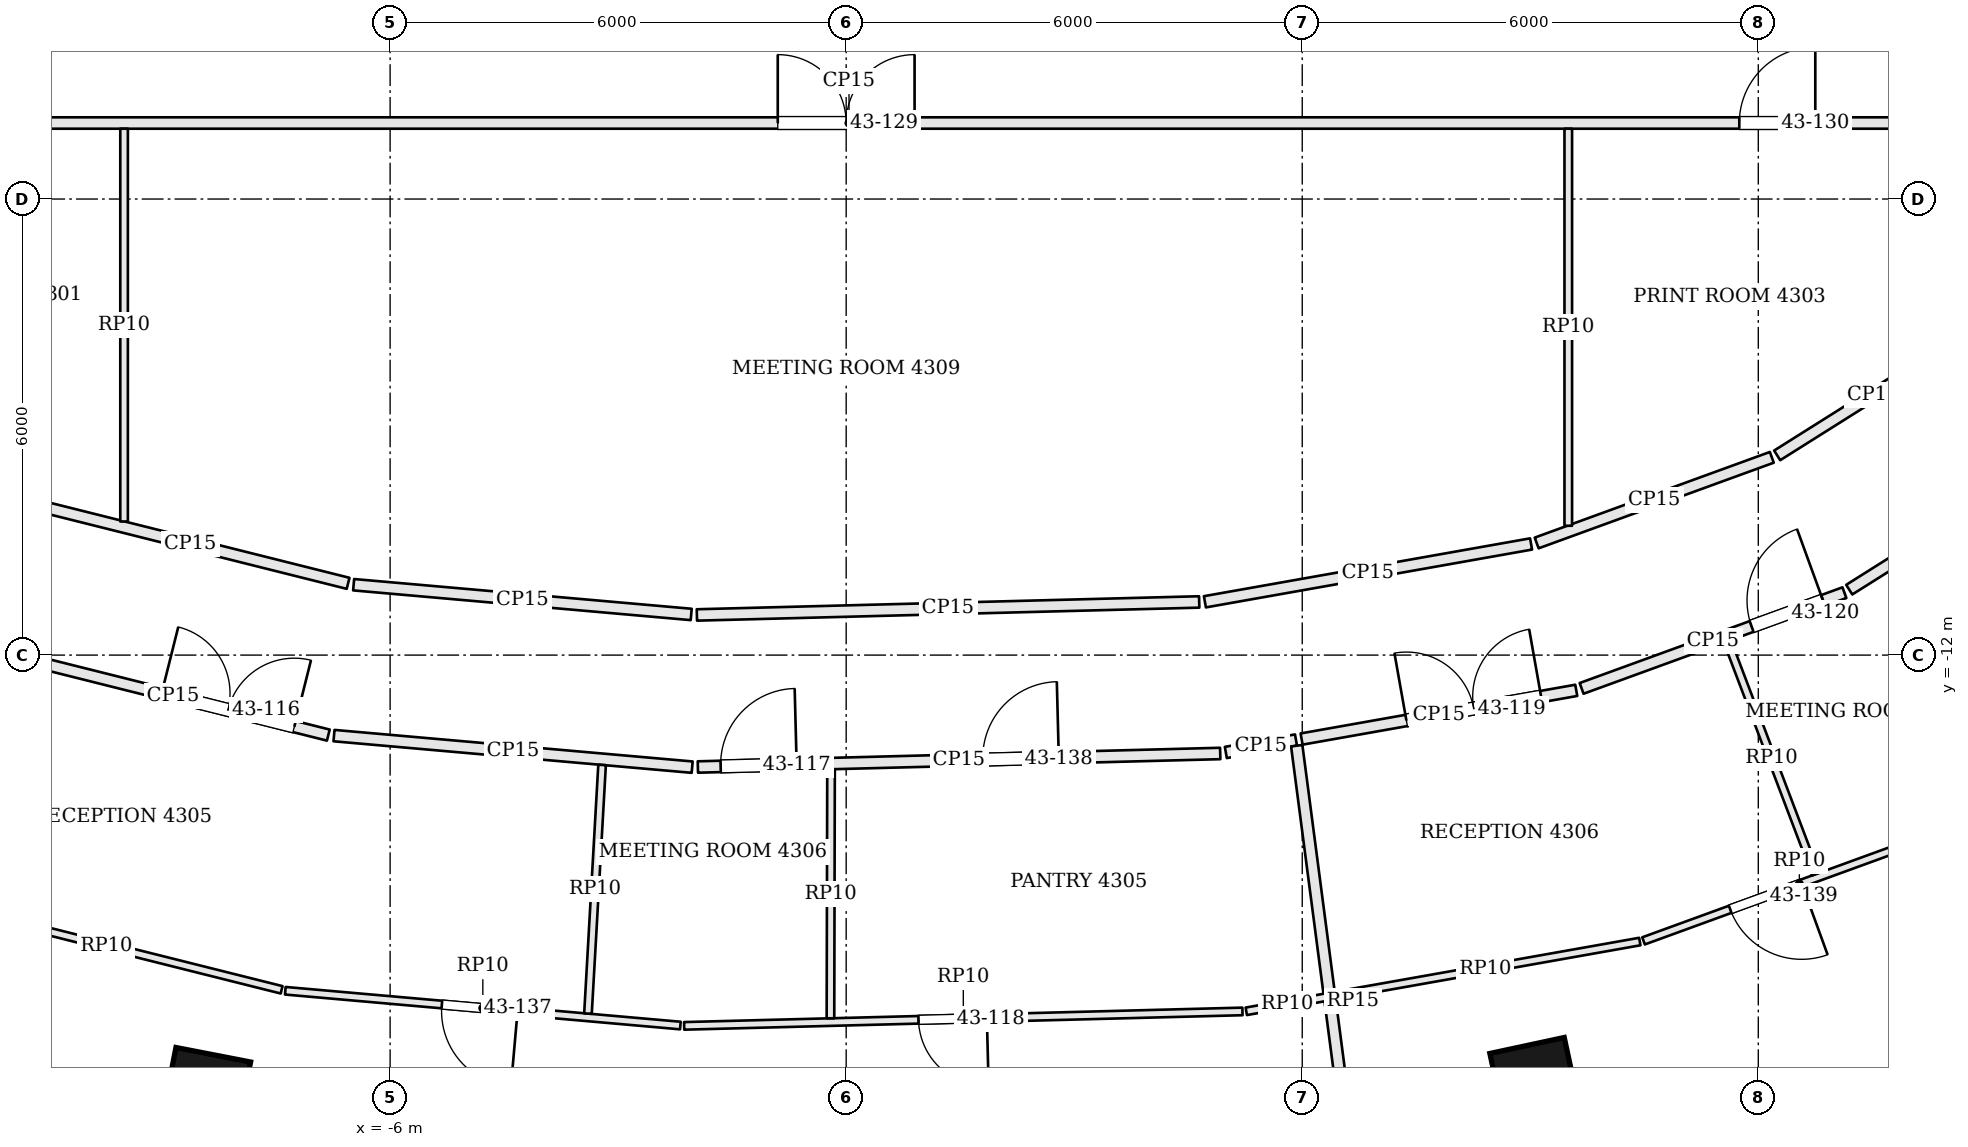
"""IFC4 building model, lengths in metres.
Left out: names, types, materials, properties, quantities, classifications, styles, units other than length and angle.
Written with IfcOpenShell. Run it as: python <this file> out.ifc"""

import sys

from ifc_helpers import new_model, si_unit, direction, frame, frame_2d, origin, origin_2d, place, context, subcontext, project, spatial, rectangle, extrude, element, fill, save


model = new_model("IFC4")
c1 = context("Model", 3, precision=1e-05, world=origin(), true_north=direction((0.0, 1.0)))
c2 = subcontext(c1, "Body", "Model", "MODEL_VIEW")
j1 = project(units=[si_unit("LENGTHUNIT", "METRE"), si_unit("PLANEANGLEUNIT", "RADIAN")], contexts=[c1])
p1 = place(None, origin())
s1 = spatial("IfcSite", under=j1, at=p1, CompositionType="ELEMENT")
p2 = place(p1, origin())
s2 = spatial("IfcBuilding", under=s1, at=p2, CompositionType="ELEMENT")
p3 = place(p2, frame((0.0, 0.0, 177.9)))
s3 = spatial("IfcBuildingStorey", under=s2, at=p3, CompositionType="ELEMENT", Elevation=177.9)
for number, where, z_axis, x_axis in (
    (1, (-8.422, -17.749, 0.0), (0.0, 0.0, 1.0), (0.982, -0.191, 0.0)),
    (2, (9.063, -17.625, 0.0), (0.0, 0.0, 1.0), (0.978, 0.21, 0.0)),
):
    element("IfcColumn", number, at=place(p3, frame(where, z_axis=z_axis, x_axis=x_axis)), inside=s3, PredefinedType="COLUMN", context=c2, shape_type="SweptSolid", body=[
        extrude(rectangle(XDim=1.0, YDim=1.0, at=origin_2d()), origin(), (0.0, 0.0, 1.0), 3.9),
    ])
p4 = place(p3, frame((-10.897, -12.029, 0.0), z_axis=(0.0, 0.0, 1.0), x_axis=(0.969999087169, -0.24310855783, 0.0)))
e3 = element("IfcWall", 3, at=p4, inside=s3, PredefinedType="PARTITIONING", context=c2, shape_type="SweptSolid", body=[
    extrude(rectangle(XDim=4.211, YDim=0.15, at=frame_2d((2.105, 0.0))), origin(), (0.0, 0.0, 1.0), 3.084),
])
p5 = place(p4, frame((1.95, 0.0, 0.0)))
e4 = element("IfcOpeningElement", 4, at=p5, cuts=e3, PredefinedType="OPENING", context=c2, shape_type="SweptSolid", body=[
    extrude(rectangle(XDim=1.8, YDim=2.1, at=frame_2d((0.9, 1.05))), frame((0.0, 0.085, 0.0), z_axis=(0.0, -1.0, 0.0), x_axis=(1.0, 0.0, 0.0)), (0.0, 0.0, 1.0), 0.17),
])
p6 = place(p3, frame((-6.738, -13.059, 0.0), z_axis=(0.0, 0.0, 1.0), x_axis=(0.996143527037, -0.087738666181, 0.0)))
e5 = element("IfcWall", 5, at=p6, inside=s3, PredefinedType="PARTITIONING", context=c2, shape_type="SweptSolid", body=[
    extrude(rectangle(XDim=4.73, YDim=0.15, at=frame_2d((2.365, 0.0))), origin(), (0.0, 0.0, 1.0), 3.084),
])
p7 = place(p3, frame((-1.951, -13.472, 0.0), z_axis=(0.0, 0.0, 1.0), x_axis=(0.999663898238, 0.025924709429, 0.0)))
e6 = element("IfcWall", 6, at=p7, inside=s3, PredefinedType="PARTITIONING", context=c2, shape_type="SweptSolid", body=[
    extrude(rectangle(XDim=6.875, YDim=0.15, at=frame_2d((3.437, 0.0))), origin(), (0.0, 0.0, 1.0), 3.084),
])
p8 = place(p7, frame((0.3, 0.0, 0.0)))
e7 = element("IfcOpeningElement", 7, at=p8, cuts=e6, PredefinedType="OPENING", context=c2, shape_type="SweptSolid", body=[
    extrude(rectangle(XDim=1.0, YDim=2.4, at=frame_2d((0.5, 1.2))), frame((0.0, 0.085, 0.0), z_axis=(0.0, -1.0, 0.0), x_axis=(1.0, 0.0, 0.0)), (0.0, 0.0, 1.0), 0.17),
])
p9 = place(p7, frame((3.75, 0.0, 0.0)))
e8 = element("IfcOpeningElement", 8, at=p9, cuts=e6, PredefinedType="OPENING", context=c2, shape_type="SweptSolid", body=[
    extrude(rectangle(XDim=1.0, YDim=2.1, at=frame_2d((0.5, 1.05))), frame((0.0, 0.085, 0.0), z_axis=(0.0, -1.0, 0.0), x_axis=(1.0, 0.0, 0.0)), (0.0, 0.0, 1.0), 0.17),
])
p10 = place(p3, frame((4.995, -13.281, 0.0), z_axis=(0.0, 0.0, 1.0), x_axis=(0.984615318048, 0.174736016506, 0.0)))
e9 = element("IfcWall", 9, at=p10, inside=s3, PredefinedType="PARTITIONING", context=c2, shape_type="SweptSolid", body=[
    extrude(rectangle(XDim=0.938, YDim=0.15, at=frame_2d((0.469, 0.0))), origin(), (0.0, 0.0, 1.0), 3.084),
])
p11 = place(p3, frame((6.807, -19.901, 0.0), z_axis=(0.0, 0.0, 1.0), x_axis=(-0.129934596003, 0.991522566945, 0.0)))
e10 = element("IfcWall", 10, at=p11, inside=s3, PredefinedType="PARTITIONING", context=c2, shape_type="SweptSolid", body=[
    extrude(rectangle(XDim=6.766, YDim=0.15, at=frame_2d((3.383, 0.0))), origin(), (0.0, 0.0, 1.0), 3.234),
])
p12 = place(p3, frame((5.992, -13.104, 0.0), z_axis=(0.0, 0.0, 1.0), x_axis=(0.98463249319, 0.174639209096, 0.0)))
e11 = element("IfcWall", 11, at=p12, inside=s3, PredefinedType="PARTITIONING", context=c2, shape_type="SweptSolid", body=[
    extrude(rectangle(XDim=3.67, YDim=0.15, at=frame_2d((1.835, 0.0))), origin(), (0.0, 0.0, 1.0), 3.084),
])
p13 = place(p12, frame((1.4, 0.0, 0.0)))
e12 = element("IfcOpeningElement", 12, at=p13, cuts=e11, PredefinedType="OPENING", context=c2, shape_type="SweptSolid", body=[
    extrude(rectangle(XDim=1.8, YDim=2.1, at=frame_2d((0.9, 1.05))), frame((0.0, 0.085, 0.0), z_axis=(0.0, -1.0, 0.0), x_axis=(1.0, 0.0, 0.0)), (0.0, 0.0, 1.0), 0.17),
])
p14 = place(p3, frame((9.676, -12.438, 0.0), z_axis=(0.0, 0.0, 1.0), x_axis=(0.939640289748, 0.342163887461, 0.0)))
e13 = element("IfcWall", 13, at=p14, inside=s3, PredefinedType="PARTITIONING", context=c2, shape_type="SweptSolid", body=[
    extrude(rectangle(XDim=3.68, YDim=0.15, at=frame_2d((1.84, 0.0))), origin(), (0.0, 0.0, 1.0), 3.084),
])
p15 = place(p14, frame((2.38, 0.0, 0.0)))
e14 = element("IfcOpeningElement", 14, at=p15, cuts=e13, PredefinedType="OPENING", context=c2, shape_type="SweptSolid", body=[
    extrude(rectangle(XDim=1.0, YDim=2.4, at=frame_2d((0.5, 1.2))), frame((0.0, 0.085, 0.0), z_axis=(0.0, -1.0, 0.0), x_axis=(1.0, 0.0, 0.0)), (0.0, 0.0, 1.0), 0.17),
])
p16 = place(p3, frame((13.197, -11.139, 0.0), z_axis=(0.0, 0.0, 1.0), x_axis=(0.846390903833, 0.532562144644, 0.0)))
e15 = element("IfcWall", 15, at=p16, inside=s3, PredefinedType="PARTITIONING", context=c2, shape_type="SweptSolid", body=[
    extrude(rectangle(XDim=3.481, YDim=0.15, at=frame_2d((1.741, 0.0))), origin(), (0.0, 0.0, 1.0), 3.084),
])
p17 = place(p16, frame((1.45, 0.0, 0.0)))
e16 = element("IfcOpeningElement", 16, at=p17, cuts=e15, PredefinedType="OPENING", context=c2, shape_type="SweptSolid", body=[
    extrude(rectangle(XDim=1.0, YDim=2.1, at=frame_2d((0.5, 1.05))), frame((0.0, 0.085, 0.0), z_axis=(0.0, -1.0, 0.0), x_axis=(1.0, 0.0, 0.0)), (0.0, 0.0, 1.0), 0.17),
])
p18 = place(p3, frame((14.777, -7.781, 0.0), z_axis=(0.0, 0.0, 1.0), x_axis=(-0.846359741043, -0.532611667862, 0.0)))
e17 = element("IfcWall", 17, at=p18, inside=s3, PredefinedType="PARTITIONING", context=c2, shape_type="SweptSolid", body=[
    extrude(rectangle(XDim=2.987, YDim=0.15, at=frame_2d((1.494, 0.0))), origin(), (0.0, 0.0, 1.0), 3.084),
])
p19 = place(p3, frame((12.178, -9.398, 0.0), z_axis=(0.0, 0.0, 1.0), x_axis=(-0.939609240084, -0.342249143093, 0.0)))
e18 = element("IfcWall", 18, at=p19, inside=s3, PredefinedType="PARTITIONING", context=c2, shape_type="SweptSolid", body=[
    extrude(rectangle(XDim=3.292, YDim=0.15, at=frame_2d((1.646, 0.0))), origin(), (0.0, 0.0, 1.0), 3.084),
])
p20 = place(p3, frame((9.01, -10.538, 0.0), z_axis=(0.0, 0.0, 1.0), x_axis=(-0.984645638575, -0.174565077936, 0.0)))
e19 = element("IfcWall", 19, at=p20, inside=s3, PredefinedType="PARTITIONING", context=c2, shape_type="SweptSolid", body=[
    extrude(rectangle(XDim=4.358, YDim=0.15, at=frame_2d((2.179, 0.0))), origin(), (0.0, 0.0, 1.0), 3.084),
])
p21 = place(p3, frame((4.645, -11.301, 0.0), z_axis=(0.0, 0.0, 1.0), x_axis=(-0.9996648469, -0.02588810291, 0.0)))
e20 = element("IfcWall", 20, at=p21, inside=s3, PredefinedType="PARTITIONING", context=c2, shape_type="SweptSolid", body=[
    extrude(rectangle(XDim=6.611, YDim=0.15, at=frame_2d((3.305, 0.0))), origin(), (0.0, 0.0, 1.0), 3.084),
])
p22 = place(p3, frame((-2.039, -11.465, 0.0), z_axis=(0.0, 0.0, 1.0), x_axis=(-0.996139855484, 0.087780341286, 0.0)))
e21 = element("IfcWall", 21, at=p22, inside=s3, PredefinedType="PARTITIONING", context=c2, shape_type="SweptSolid", body=[
    extrude(rectangle(XDim=4.458, YDim=0.15, at=frame_2d((2.229, 0.0))), origin(), (0.0, 0.0, 1.0), 3.084),
])
p23 = place(p3, frame((-6.553, -11.056, 0.0), z_axis=(0.0, 0.0, 1.0), x_axis=(-0.970004917182, 0.243085294995, 0.0)))
e22 = element("IfcWall", 22, at=p23, inside=s3, PredefinedType="PARTITIONING", context=c2, shape_type="SweptSolid", body=[
    extrude(rectangle(XDim=4.284, YDim=0.15, at=frame_2d((2.142, 0.0))), origin(), (0.0, 0.0, 1.0), 3.084),
])
p24 = place(p3, frame((-14.925, -5.0, 0.0), z_axis=(0.0, 0.0, 1.0), x_axis=(1.0, 0.0, 0.0)))
e23 = element("IfcWall", 23, at=p24, inside=s3, PredefinedType="PARTITIONING", context=c2, shape_type="SweptSolid", body=[
    extrude(rectangle(XDim=29.925, YDim=0.15, at=frame_2d((14.962, 0.0))), origin(), (0.0, 0.0, 1.0), 3.084),
])
p25 = place(p24, frame((2.175, 0.0, 0.0)))
e24 = element("IfcOpeningElement", 24, at=p25, cuts=e23, PredefinedType="OPENING", context=c2, shape_type="SweptSolid", body=[
    extrude(rectangle(XDim=1.0, YDim=2.1, at=frame_2d((0.5, 1.05))), frame((0.0, 0.085, 0.0), z_axis=(0.0, -1.0, 0.0), x_axis=(1.0, 0.0, 0.0)), (0.0, 0.0, 1.0), 0.17),
])
p26 = place(p24, frame((14.025, 0.0, 0.0)))
e25 = element("IfcOpeningElement", 25, at=p26, cuts=e23, PredefinedType="OPENING", context=c2, shape_type="SweptSolid", body=[
    extrude(rectangle(XDim=1.8, YDim=2.1, at=frame_2d((0.9, 1.05))), frame((0.0, 0.085, 0.0), z_axis=(0.0, -1.0, 0.0), x_axis=(1.0, 0.0, 0.0)), (0.0, 0.0, 1.0), 0.17),
])
p27 = place(p24, frame((26.675, 0.0, 0.0)))
e26 = element("IfcOpeningElement", 26, at=p27, cuts=e23, PredefinedType="OPENING", context=c2, shape_type="SweptSolid", body=[
    extrude(rectangle(XDim=1.0, YDim=2.1, at=frame_2d((0.5, 1.05))), frame((0.0, 0.085, 0.0), z_axis=(0.0, -1.0, 0.0), x_axis=(1.0, 0.0, 0.0)), (0.0, 0.0, 1.0), 0.17),
])
p28 = place(p3, frame((6.34, -16.496, 0.0), z_axis=(0.0, 0.0, 1.0), x_axis=(-0.984632558058, -0.174638843366, 0.0)))
e27 = element("IfcWall", 27, at=p28, inside=s3, PredefinedType="PARTITIONING", context=c2, shape_type="SweptSolid", body=[
    extrude(rectangle(XDim=1.093, YDim=0.1, at=frame_2d((0.547, 0.0))), origin(), (0.0, 0.0, 1.0), 3.084),
])
p29 = place(p3, frame((5.214, -16.688, 0.0), z_axis=(0.0, 0.0, 1.0), x_axis=(-0.999664981446, -0.025882906921, 0.0)))
e28 = element("IfcWall", 28, at=p29, inside=s3, PredefinedType="PARTITIONING", context=c2, shape_type="SweptSolid", body=[
    extrude(rectangle(XDim=7.348, YDim=0.1, at=frame_2d((3.674, 0.0))), origin(), (0.0, 0.0, 1.0), 3.084),
])
p30 = place(p29, frame((3.364, 0.0, 0.0)))
e29 = element("IfcOpeningElement", 29, at=p30, cuts=e28, PredefinedType="OPENING", context=c2, shape_type="SweptSolid", body=[
    extrude(rectangle(XDim=0.9, YDim=2.1, at=frame_2d((0.45, 1.05))), frame((0.0, 0.06, 0.0), z_axis=(0.0, -1.0, 0.0), x_axis=(1.0, 0.0, 0.0)), (0.0, 0.0, 1.0), 0.12),
])
p31 = place(p3, frame((-2.181, -16.874, 0.0), z_axis=(0.0, 0.0, 1.0), x_axis=(-0.996143934904, 0.087734035321, 0.0)))
e30 = element("IfcWall", 30, at=p31, inside=s3, PredefinedType="PARTITIONING", context=c2, shape_type="SweptSolid", body=[
    extrude(rectangle(XDim=5.218, YDim=0.1, at=frame_2d((2.609, 0.0))), origin(), (0.0, 0.0, 1.0), 3.084),
])
p32 = place(p31, frame((2.15, 0.0, 0.0)))
e31 = element("IfcOpeningElement", 31, at=p32, cuts=e30, PredefinedType="OPENING", context=c2, shape_type="SweptSolid", body=[
    extrude(rectangle(XDim=1.0, YDim=2.1, at=frame_2d((0.5, 1.05))), frame((0.0, 0.06, 0.0), z_axis=(0.0, -1.0, 0.0), x_axis=(1.0, 0.0, 0.0)), (0.0, 0.0, 1.0), 0.12),
])
p33 = place(p3, frame((-7.427, -16.404, 0.0), z_axis=(0.0, 0.0, 1.0), x_axis=(-0.970009433409, 0.243067272783, 0.0)))
e32 = element("IfcWall", 32, at=p33, inside=s3, PredefinedType="PARTITIONING", context=c2, shape_type="SweptSolid", body=[
    extrude(rectangle(XDim=4.754, YDim=0.1, at=frame_2d((2.377, 0.0))), origin(), (0.0, 0.0, 1.0), 3.084),
])
p34 = place(p3, frame((-3.211, -13.445, 0.0), z_axis=(0.0, 0.0, 1.0), x_axis=(-0.056703901856, -0.99839103938, 0.0)))
e33 = element("IfcWall", 33, at=p34, inside=s3, PredefinedType="PARTITIONING", context=c2, shape_type="SweptSolid", body=[
    extrude(rectangle(XDim=3.277, YDim=0.1, at=frame_2d((1.638, 0.0))), origin(), (0.0, 0.0, 1.0), 3.084),
])
p35 = place(p3, frame((-0.199, -13.502, 0.0), z_axis=(0.0, 0.0, 1.0), x_axis=(-0.002309978934, -0.999997331995, 0.0)))
e34 = element("IfcWall", 34, at=p35, inside=s3, PredefinedType="PARTITIONING", context=c2, shape_type="SweptSolid", body=[
    extrude(rectangle(XDim=3.276, YDim=0.1, at=frame_2d((1.638, 0.0))), origin(), (0.0, 0.0, 1.0), 3.084),
])
p36 = place(p3, frame((14.59, -14.267, 0.0), z_axis=(0.0, 0.0, 1.0), x_axis=(-0.939623405418, -0.342210251148, 0.0)))
e35 = element("IfcWall", 35, at=p36, inside=s3, PredefinedType="PARTITIONING", context=c2, shape_type="SweptSolid", body=[
    extrude(rectangle(XDim=4.363, YDim=0.1, at=frame_2d((2.182, 0.0))), origin(), (0.0, 0.0, 1.0), 3.084),
])
p37 = place(p36, frame((2.15, 0.0, 0.0)))
e36 = element("IfcOpeningElement", 36, at=p37, cuts=e35, PredefinedType="OPENING", context=c2, shape_type="SweptSolid", body=[
    extrude(rectangle(XDim=1.0, YDim=2.1, at=frame_2d((0.5, 1.05))), frame((0.0, 0.06, 0.0), z_axis=(0.0, -1.0, 0.0), x_axis=(1.0, 0.0, 0.0)), (0.0, 0.0, 1.0), 0.12),
])
p38 = place(p3, frame((10.441, -15.769, 0.0), z_axis=(0.0, 0.0, 1.0), x_axis=(-0.984637220861, -0.174612551941, 0.0)))
e37 = element("IfcWall", 37, at=p38, inside=s3, PredefinedType="PARTITIONING", context=c2, shape_type="SweptSolid", body=[
    extrude(rectangle(XDim=4.125, YDim=0.1, at=frame_2d((2.062, 0.0))), origin(), (0.0, 0.0, 1.0), 3.084),
])
p39 = place(p3, frame((11.594, -11.819, 0.0), z_axis=(0.0, 0.0, 1.0), x_axis=(0.354584575087, -0.935023945742, 0.0)))
e38 = element("IfcWall", 38, at=p39, inside=s3, PredefinedType="PARTITIONING", context=c2, shape_type="SweptSolid", body=[
    extrude(rectangle(XDim=3.275, YDim=0.1, at=frame_2d((1.638, 0.0))), origin(), (0.0, 0.0, 1.0), 3.084),
])
p40 = place(p3, frame((-9.5, -10.242, 0.0), z_axis=(0.0, 0.0, 1.0), x_axis=(0.0, 1.0, 0.0)))
e39 = element("IfcWall", 39, at=p40, inside=s3, PredefinedType="PARTITIONING", context=c2, shape_type="SweptSolid", body=[
    extrude(rectangle(XDim=5.167, YDim=0.1, at=frame_2d((2.583, 0.0))), origin(), (0.0, 0.0, 1.0), 3.084),
])
p41 = place(p3, frame((9.5, -10.299, 0.0), z_axis=(0.0, 0.0, 1.0), x_axis=(0.0, 1.0, 0.0)))
e40 = element("IfcWall", 40, at=p41, inside=s3, PredefinedType="PARTITIONING", context=c2, shape_type="SweptSolid", body=[
    extrude(rectangle(XDim=5.224, YDim=0.1, at=frame_2d((2.612, 0.0))), origin(), (0.0, 0.0, 1.0), 3.084),
])
p42 = place(p5, origin())
e41 = element("IfcDoor", 41, at=p42, inside=s3, OperationType="DOUBLE_DOOR_SINGLE_SWING", PredefinedType="DOOR", context=c2, shape_type="SweptSolid", body=[
    extrude(rectangle(XDim=1.8, YDim=2.1, at=frame_2d((0.9, 1.05))), frame((0.0, 0.025, 0.0), z_axis=(0.0, -1.0, 0.0), x_axis=(1.0, 0.0, 0.0)), (0.0, 0.0, 1.0), 0.05),
])
fill(e4, e41)
p43 = place(p8, origin())
e42 = element("IfcDoor", 42, at=p43, inside=s3, OperationType="SINGLE_SWING_RIGHT", PredefinedType="DOOR", context=c2, shape_type="SweptSolid", body=[
    extrude(rectangle(XDim=1.0, YDim=2.4, at=frame_2d((0.5, 1.2))), frame((0.0, 0.025, 0.0), z_axis=(0.0, -1.0, 0.0), x_axis=(1.0, 0.0, 0.0)), (0.0, 0.0, 1.0), 0.05),
])
fill(e7, e42)
p44 = place(p30, origin())
e43 = element("IfcDoor", 43, at=p44, inside=s3, OperationType="SINGLE_SWING_LEFT", PredefinedType="DOOR", context=c2, shape_type="SweptSolid", body=[
    extrude(rectangle(XDim=0.9, YDim=2.1, at=frame_2d((0.45, 1.05))), frame((0.0, 0.025, 0.0), z_axis=(0.0, -1.0, 0.0), x_axis=(1.0, 0.0, 0.0)), (0.0, 0.0, 1.0), 0.05),
])
fill(e29, e43)
p45 = place(p13, origin())
e44 = element("IfcDoor", 44, at=p45, inside=s3, OperationType="DOUBLE_DOOR_SINGLE_SWING", PredefinedType="DOOR", context=c2, shape_type="SweptSolid", body=[
    extrude(rectangle(XDim=1.8, YDim=2.1, at=frame_2d((0.9, 1.05))), frame((0.0, 0.025, 0.0), z_axis=(0.0, -1.0, 0.0), x_axis=(1.0, 0.0, 0.0)), (0.0, 0.0, 1.0), 0.05),
])
fill(e12, e44)
p46 = place(p15, origin())
e45 = element("IfcDoor", 45, at=p46, inside=s3, OperationType="SINGLE_SWING_RIGHT", PredefinedType="DOOR", context=c2, shape_type="SweptSolid", body=[
    extrude(rectangle(XDim=1.0, YDim=2.4, at=frame_2d((0.5, 1.2))), frame((0.0, 0.025, 0.0), z_axis=(0.0, -1.0, 0.0), x_axis=(1.0, 0.0, 0.0)), (0.0, 0.0, 1.0), 0.05),
])
fill(e14, e45)
p47 = place(p26, origin())
e46 = element("IfcDoor", 46, at=p47, inside=s3, OperationType="DOUBLE_DOOR_SINGLE_SWING", PredefinedType="DOOR", context=c2, shape_type="SweptSolid", body=[
    extrude(rectangle(XDim=1.8, YDim=2.1, at=frame_2d((0.9, 1.05))), frame((0.0, 0.025, 0.0), z_axis=(0.0, -1.0, 0.0), x_axis=(1.0, 0.0, 0.0)), (0.0, 0.0, 1.0), 0.05),
])
fill(e25, e46)
p48 = place(p27, origin())
e47 = element("IfcDoor", 47, at=p48, inside=s3, OperationType="SINGLE_SWING_RIGHT", PredefinedType="DOOR", context=c2, shape_type="SweptSolid", body=[
    extrude(rectangle(XDim=1.0, YDim=2.1, at=frame_2d((0.5, 1.05))), frame((0.0, 0.025, 0.0), z_axis=(0.0, -1.0, 0.0), x_axis=(1.0, 0.0, 0.0)), (0.0, 0.0, 1.0), 0.05),
])
fill(e26, e47)
p49 = place(p32, origin())
e48 = element("IfcDoor", 48, at=p49, inside=s3, OperationType="SINGLE_SWING_LEFT", PredefinedType="DOOR", context=c2, shape_type="SweptSolid", body=[
    extrude(rectangle(XDim=1.0, YDim=2.1, at=frame_2d((0.5, 1.05))), frame((0.0, 0.025, 0.0), z_axis=(0.0, -1.0, 0.0), x_axis=(1.0, 0.0, 0.0)), (0.0, 0.0, 1.0), 0.05),
])
fill(e31, e48)
p50 = place(p9, origin())
e49 = element("IfcDoor", 49, at=p50, inside=s3, OperationType="SINGLE_SWING_RIGHT", PredefinedType="DOOR", context=c2, shape_type="SweptSolid", body=[
    extrude(rectangle(XDim=1.0, YDim=2.1, at=frame_2d((0.5, 1.05))), frame((0.0, 0.025, 0.0), z_axis=(0.0, -1.0, 0.0), x_axis=(1.0, 0.0, 0.0)), (0.0, 0.0, 1.0), 0.05),
])
fill(e8, e49)
p51 = place(p37, origin())
e50 = element("IfcDoor", 50, at=p51, inside=s3, OperationType="SINGLE_SWING_LEFT", PredefinedType="DOOR", context=c2, shape_type="SweptSolid", body=[
    extrude(rectangle(XDim=1.0, YDim=2.1, at=frame_2d((0.5, 1.05))), frame((0.0, 0.025, 0.0), z_axis=(0.0, -1.0, 0.0), x_axis=(1.0, 0.0, 0.0)), (0.0, 0.0, 1.0), 0.05),
])
fill(e36, e50)
save(model, sys.argv[1])
